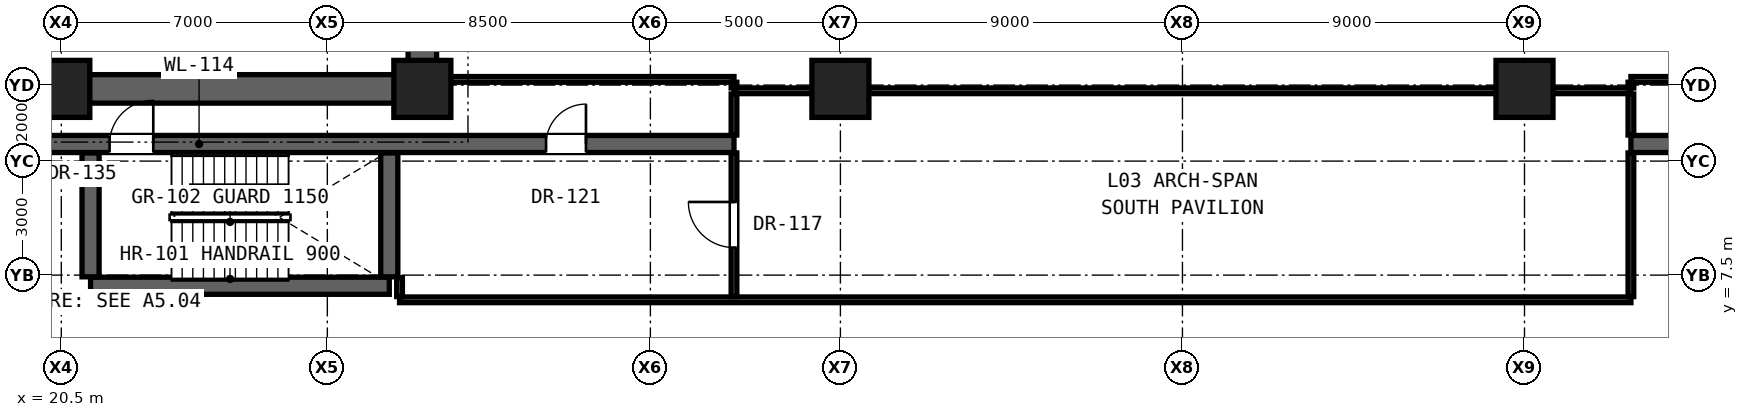
"""IFC4 building model, lengths in metres.
Left out: names, types, materials, properties, quantities, classifications, styles, units other than length and angle.
Written with IfcOpenShell. Run it as: python <this file> out.ifc"""

import sys

from ifc_helpers import new_model, si_unit, direction, frame, frame_2d, origin, origin_2d, place, context, subcontext, project, spatial, rectangle, extrude, element, fill, save


model = new_model("IFC4")
c1 = context("Model", 3, precision=1e-05, world=origin(), true_north=direction((0.0, 1.0)))
c2 = subcontext(c1, "Body", "Model", "MODEL_VIEW")
j1 = project(units=[si_unit("LENGTHUNIT", "METRE"), si_unit("PLANEANGLEUNIT", "RADIAN")], contexts=[c1])
p1 = place(None, origin())
s1 = spatial("IfcSite", under=j1, at=p1, CompositionType="ELEMENT")
p2 = place(p1, origin())
s2 = spatial("IfcBuilding", under=s1, at=p2, CompositionType="ELEMENT")
p3 = place(p2, frame((0.0, 0.0, 13.8)))
s3 = spatial("IfcBuildingStorey", under=s2, at=p3, CompositionType="ELEMENT", Elevation=13.8)
for number, where, z_axis, x_axis in (
    (1, (20.5, 12.4, 0.0), (0.0, 0.0, 1.0), (1.0, 0.0, 0.0)),
    (2, (30.0, 12.4, 0.0), (0.0, 0.0, 1.0), (1.0, 0.0, 0.0)),
):
    element("IfcColumn", number, at=place(p3, frame(where, z_axis=z_axis, x_axis=x_axis)), inside=s3, PredefinedType="COLUMN", context=c2, shape_type="SweptSolid", body=[
        extrude(rectangle(XDim=1.5, YDim=1.5, at=origin_2d()), origin(), (0.0, 0.0, 1.0), 4.3),
    ])
p4 = place(p3, frame((11.0, 12.4, 0.0), z_axis=(0.0, 0.0, 1.0), x_axis=(1.0, 0.0, 0.0)))
e3 = element("IfcWall", 3, at=p4, inside=s3, PredefinedType="SHEAR", context=c2, shape_type="SweptSolid", body=[
    extrude(rectangle(XDim=19.0, YDim=0.75, at=frame_2d((9.5, 0.0))), origin(), (0.0, 0.0, 1.0), 3.65),
])
p5 = place(p3, frame((30.0, 12.4, 0.0), z_axis=(0.0, 0.0, 1.0), x_axis=(0.0, 1.0, 0.0)))
e4 = element("IfcWall", 4, at=p5, inside=s3, PredefinedType="SHEAR", context=c2, shape_type="SweptSolid", body=[
    extrude(rectangle(XDim=6.0, YDim=0.75, at=frame_2d((3.0, 0.0))), origin(), (0.0, 0.0, 1.0), 3.65),
])
for number, where, z_axis, x_axis in (
    (5, (41.0, 12.4, 0.0), (0.0, 0.0, 1.0), (1.0, 0.0, 0.0)),
    (6, (59.0, 12.4, 0.0), (0.0, 0.0, 1.0), (1.0, 0.0, 0.0)),
):
    element("IfcColumn", number, at=place(p3, frame(where, z_axis=z_axis, x_axis=x_axis)), inside=s3, PredefinedType="COLUMN", context=c2, shape_type="SweptSolid", body=[
        extrude(rectangle(XDim=1.5, YDim=1.5, at=origin_2d()), origin(), (0.0, 0.0, 1.0), 4.3),
    ])
p6 = place(p3, frame((29.4, 6.85, 0.0), z_axis=(0.0, 0.0, 1.0), x_axis=(1.0, 0.0, 0.0)))
e7 = element("IfcWall", 7, at=p6, inside=s3, PredefinedType="PARTITIONING", context=c2, shape_type="SweptSolid", body=[
    extrude(rectangle(XDim=32.4, YDim=0.15, at=frame_2d((16.2, 0.0))), origin(), (0.0, 0.0, 1.0), 2.869),
])
p7 = place(p3, frame((21.27, 7.22, 0.0), z_axis=(0.0, 0.0, 1.0), x_axis=(1.0, 0.0, 0.0)))
e8 = element("IfcWall", 8, at=p7, inside=s3, PredefinedType="SHEAR", context=c2, shape_type="SweptSolid", body=[
    extrude(rectangle(XDim=7.86, YDim=0.45, at=frame_2d((3.93, 0.0))), origin(), (0.0, 0.0, 1.0), 3.65),
])
p8 = place(p3, frame((10.05, 10.95, 0.0), z_axis=(0.0, 0.0, 1.0), x_axis=(1.0, 0.0, 0.0)))
e9 = element("IfcWall", 9, at=p8, inside=s3, PredefinedType="SHEAR", context=c2, shape_type="SweptSolid", body=[
    extrude(rectangle(XDim=28.15, YDim=0.45, at=frame_2d((14.075, 0.0))), origin(), (0.0, 0.0, 1.0), 3.65),
])
p9 = place(p8, frame((11.72, 0.0, 0.0)))
e10 = element("IfcOpeningElement", 10, at=p9, cuts=e9, PredefinedType="OPENING", context=c2, shape_type="SweptSolid", body=[
    extrude(rectangle(XDim=1.15, YDim=2.2, at=frame_2d((0.575, 1.1))), frame((0.0, 0.235, 0.0), z_axis=(0.0, -1.0, 0.0), x_axis=(1.0, 0.0, 0.0)), (0.0, 0.0, 1.0), 0.47),
])
p10 = place(p8, frame((23.205, 0.0, 0.0)))
e11 = element("IfcOpeningElement", 11, at=p10, cuts=e9, PredefinedType="OPENING", context=c2, shape_type="SweptSolid", body=[
    extrude(rectangle(XDim=1.05, YDim=2.2, at=frame_2d((0.525, 1.1))), frame((0.0, 0.235, 0.0), z_axis=(0.0, -1.0, 0.0), x_axis=(1.0, 0.0, 0.0)), (0.0, 0.0, 1.0), 0.47),
])
p11 = place(p3, frame((61.8, 10.95, 0.0), z_axis=(0.0, 0.0, 1.0), x_axis=(1.0, 0.0, 0.0)))
e12 = element("IfcWall", 12, at=p11, inside=s3, PredefinedType="SHEAR", context=c2, shape_type="SweptSolid", body=[
    extrude(rectangle(XDim=29.15, YDim=0.45, at=frame_2d((14.575, 0.0))), origin(), (0.0, 0.0, 1.0), 3.65),
])
p12 = place(p11, frame((7.57, 0.0, 0.0)))
e13 = element("IfcOpeningElement", 13, at=p12, cuts=e12, PredefinedType="OPENING", context=c2, shape_type="SweptSolid", body=[
    extrude(rectangle(XDim=1.15, YDim=2.2, at=frame_2d((0.575, 1.1))), frame((0.0, 0.235, 0.0), z_axis=(0.0, -1.0, 0.0), x_axis=(1.0, 0.0, 0.0)), (0.0, 0.0, 1.0), 0.47),
])
p13 = place(p11, frame((21.63, 0.0, 0.0)))
e14 = element("IfcOpeningElement", 14, at=p13, cuts=e12, PredefinedType="OPENING", context=c2, shape_type="SweptSolid", body=[
    extrude(rectangle(XDim=1.05, YDim=2.2, at=frame_2d((0.525, 1.1))), frame((0.0, 0.235, 0.0), z_axis=(0.0, -1.0, 0.0), x_axis=(1.0, 0.0, 0.0)), (0.0, 0.0, 1.0), 0.47),
])
p14 = place(p3, frame((38.2, 12.35, 0.0), z_axis=(0.0, 0.0, 1.0), x_axis=(1.0, 0.0, 0.0)))
e15 = element("IfcWall", 15, at=p14, inside=s3, PredefinedType="PARTITIONING", context=c2, shape_type="SweptSolid", body=[
    extrude(rectangle(XDim=23.6, YDim=0.15, at=frame_2d((11.8, 0.0))), origin(), (0.0, 0.0, 1.0), 2.602),
])
p15 = place(p3, frame((30.37, 12.65, 0.0), z_axis=(0.0, 0.0, 1.0), x_axis=(1.0, 0.0, 0.0)))
e16 = element("IfcWall", 16, at=p15, inside=s3, PredefinedType="PARTITIONING", context=c2, shape_type="SweptSolid", body=[
    extrude(rectangle(XDim=7.83, YDim=0.15, at=frame_2d((3.915, 0.0))), origin(), (0.0, 0.0, 1.0), 2.694),
])
p16 = place(p3, frame((61.8, 12.65, 0.0), z_axis=(0.0, 0.0, 1.0), x_axis=(1.0, 0.0, 0.0)))
e17 = element("IfcWall", 17, at=p16, inside=s3, PredefinedType="PARTITIONING", context=c2, shape_type="SweptSolid", body=[
    extrude(rectangle(XDim=29.15, YDim=0.15, at=frame_2d((14.575, 0.0))), origin(), (0.0, 0.0, 1.0), 2.786),
])
for number, where, z_axis, x_axis in (
    (18, (21.27, 7.455, 0.0), (0.0, 0.0, 1.0), (0.0, 1.0, 0.0)),
    (19, (29.13, 7.455, 0.0), (0.0, 0.0, 1.0), (0.0, 1.0, 0.0)),
):
    element("IfcWall", number, at=place(p3, frame(where, z_axis=z_axis, x_axis=x_axis)), inside=s3, PredefinedType="SHEAR", context=c2, shape_type="SweptSolid", body=[
        extrude(rectangle(XDim=3.26, YDim=0.45, at=frame_2d((1.63, 0.0))), origin(), (0.0, 0.0, 1.0), 3.65),
    ])
p17 = place(p3, frame((29.4, 6.935, 0.0), z_axis=(0.0, 0.0, 1.0), x_axis=(0.0, 1.0, 0.0)))
e20 = element("IfcWall", 20, at=p17, inside=s3, PredefinedType="PARTITIONING", context=c2, shape_type="SweptSolid", body=[
    extrude(rectangle(XDim=0.5, YDim=0.15, at=frame_2d((0.25, 0.0))), origin(), (0.0, 0.0, 1.0), 3.65),
])
p18 = place(p3, frame((38.2, 6.935, 0.0), z_axis=(0.0, 0.0, 1.0), x_axis=(0.0, 1.0, 0.0)))
e21 = element("IfcWall", 21, at=p18, inside=s3, PredefinedType="PARTITIONING", context=c2, shape_type="SweptSolid", body=[
    extrude(rectangle(XDim=3.78, YDim=0.15, at=frame_2d((1.89, 0.0))), origin(), (0.0, 0.0, 1.0), 3.65),
])
p19 = place(p18, frame((1.29, 0.0, 0.0)))
e22 = element("IfcOpeningElement", 22, at=p19, cuts=e21, PredefinedType="OPENING", context=c2, shape_type="SweptSolid", body=[
    extrude(rectangle(XDim=1.2, YDim=2.25, at=frame_2d((0.6, 1.125))), frame((0.0, 0.085, 0.0), z_axis=(0.0, -1.0, 0.0), x_axis=(1.0, 0.0, 0.0)), (0.0, 0.0, 1.0), 0.17),
])
p20 = place(p3, frame((38.2, 11.185, 0.0), z_axis=(0.0, 0.0, 1.0), x_axis=(0.0, 1.0, 0.0)))
e23 = element("IfcWall", 23, at=p20, inside=s3, PredefinedType="PARTITIONING", context=c2, shape_type="SweptSolid", body=[
    extrude(rectangle(XDim=1.08, YDim=0.15, at=frame_2d((0.54, 0.0))), origin(), (0.0, 0.0, 1.0), 2.694),
])
p21 = place(p3, frame((38.2, 12.425, 0.0), z_axis=(0.0, 0.0, 1.0), x_axis=(0.0, 1.0, 0.0)))
e24 = element("IfcWall", 24, at=p21, inside=s3, PredefinedType="PARTITIONING", context=c2, shape_type="SweptSolid", body=[
    extrude(rectangle(XDim=0.15, YDim=0.15, at=frame_2d((0.075, 0.0))), origin(), (0.0, 0.0, 1.0), 2.694),
])
p22 = place(p3, frame((61.8, 6.935, 0.0), z_axis=(0.0, 0.0, 1.0), x_axis=(0.0, 1.0, 0.0)))
e25 = element("IfcWall", 25, at=p22, inside=s3, PredefinedType="PARTITIONING", context=c2, shape_type="SweptSolid", body=[
    extrude(rectangle(XDim=3.78, YDim=0.15, at=frame_2d((1.89, 0.0))), origin(), (0.0, 0.0, 1.0), 3.65),
])
p23 = place(p3, frame((61.8, 11.185, 0.0), z_axis=(0.0, 0.0, 1.0), x_axis=(0.0, 1.0, 0.0)))
e26 = element("IfcWall", 26, at=p23, inside=s3, PredefinedType="PARTITIONING", context=c2, shape_type="SweptSolid", body=[
    extrude(rectangle(XDim=1.08, YDim=0.15, at=frame_2d((0.54, 0.0))), origin(), (0.0, 0.0, 1.0), 3.65),
])
p24 = place(p3, frame((61.8, 12.425, 0.0), z_axis=(0.0, 0.0, 1.0), x_axis=(0.0, 1.0, 0.0)))
e27 = element("IfcWall", 27, at=p24, inside=s3, PredefinedType="PARTITIONING", context=c2, shape_type="SweptSolid", body=[
    extrude(rectangle(XDim=0.15, YDim=0.15, at=frame_2d((0.075, 0.0))), origin(), (0.0, 0.0, 1.0), 3.65),
])
p25 = place(p9, origin())
e28 = element("IfcDoor", 28, at=p25, inside=s3, OperationType="SINGLE_SWING_RIGHT", PredefinedType="DOOR", context=c2, shape_type="SweptSolid", body=[
    extrude(rectangle(XDim=1.15, YDim=2.2, at=frame_2d((0.575, 1.1))), frame((0.0, 0.025, 0.0), z_axis=(0.0, -1.0, 0.0), x_axis=(1.0, 0.0, 0.0)), (0.0, 0.0, 1.0), 0.05),
])
fill(e10, e28)
p26 = place(p19, origin())
e29 = element("IfcDoor", 29, at=p26, inside=s3, OperationType="SINGLE_SWING_RIGHT", PredefinedType="DOOR", context=c2, shape_type="SweptSolid", body=[
    extrude(rectangle(XDim=1.2, YDim=2.25, at=frame_2d((0.6, 1.125))), frame((0.0, 0.025, 0.0), z_axis=(0.0, -1.0, 0.0), x_axis=(1.0, 0.0, 0.0)), (0.0, 0.0, 1.0), 0.05),
])
fill(e22, e29)
p27 = place(p10, origin())
e30 = element("IfcDoor", 30, at=p27, inside=s3, OperationType="SINGLE_SWING_RIGHT", PredefinedType="DOOR", context=c2, shape_type="SweptSolid", body=[
    extrude(rectangle(XDim=1.05, YDim=2.2, at=frame_2d((0.525, 1.1))), frame((0.0, 0.025, 0.0), z_axis=(0.0, -1.0, 0.0), x_axis=(1.0, 0.0, 0.0)), (0.0, 0.0, 1.0), 0.05),
])
fill(e11, e30)
save(model, sys.argv[1])
